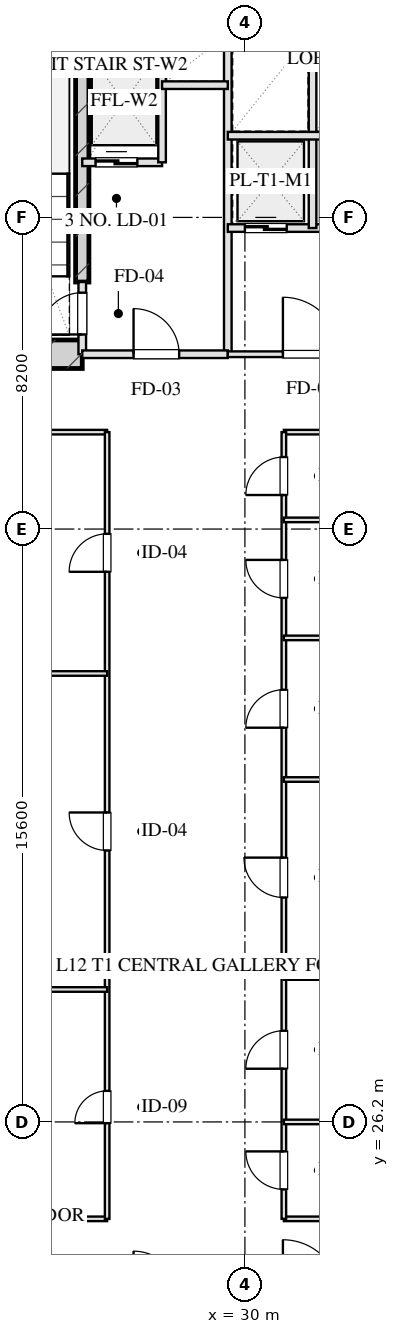
"""IFC4 building model, lengths in metres.
Left out: names, types, materials, properties, quantities, classifications, styles, units other than length and angle.
Written with IfcOpenShell. Run it as: python <this file> out.ifc"""

import sys

from ifc_helpers import new_model, si_unit, direction, frame, frame_2d, origin, place, context, subcontext, project, spatial, rectangle, extrude, element, fill, save


model = new_model("IFC4")
c1 = context("Model", 3, precision=1e-05, world=origin(), true_north=direction((0.0, 1.0)))
c2 = subcontext(c1, "Body", "Model", "MODEL_VIEW")
j1 = project(units=[si_unit("LENGTHUNIT", "METRE"), si_unit("PLANEANGLEUNIT", "RADIAN")], contexts=[c1])
p1 = place(None, origin())
s1 = spatial("IfcSite", under=j1, at=p1, CompositionType="ELEMENT")
p2 = place(p1, origin())
s2 = spatial("IfcBuilding", under=s1, at=p2, CompositionType="ELEMENT")
p3 = place(p2, frame((0.0, 0.0, 54.05)))
s3 = spatial("IfcBuildingStorey", under=s2, at=p3, CompositionType="ELEMENT", Elevation=54.05)
p4 = place(p3, frame((25.72, 48.3, 0.0), z_axis=(0.0, 0.0, 1.0), x_axis=(0.0, 1.0, 0.0)))
e1 = element("IfcWall", 1, at=p4, inside=s3, PredefinedType="SHEAR", context=c2, shape_type="SweptSolid", body=[
    extrude(rectangle(XDim=6.98, YDim=0.35, at=frame_2d((3.49, 0.0))), origin(), (0.0, 0.0, 1.0), 3.45),
])
p5 = place(p3, frame((21.425, 46.4, 0.0), z_axis=(0.0, 0.0, 1.0), x_axis=(1.0, 0.0, 0.0)))
e2 = element("IfcWall", 2, at=p5, inside=s3, PredefinedType="SHEAR", context=c2, shape_type="SweptSolid", body=[
    extrude(rectangle(XDim=4.295, YDim=0.75, at=frame_2d((2.147, 0.0))), origin(), (0.0, 0.0, 1.0), 3.45),
])
p6 = place(p3, frame((25.72, 46.4, 0.0), z_axis=(0.0, 0.0, 1.0), x_axis=(0.0, 1.0, 0.0)))
e3 = element("IfcWall", 3, at=p6, inside=s3, PredefinedType="PARTITIONING", context=c2, shape_type="SweptSolid", body=[
    extrude(rectangle(XDim=1.9, YDim=0.2, at=frame_2d((0.95, 0.0))), origin(), (0.0, 0.0, 1.0), 3.175),
])
p7 = place(p6, frame((0.52, 0.0, 0.0)))
e4 = element("IfcOpeningElement", 4, at=p7, cuts=e3, PredefinedType="OPENING", context=c2, shape_type="SweptSolid", body=[
    extrude(rectangle(XDim=1.1, YDim=2.05, at=frame_2d((0.55, 1.025))), frame((0.0, 0.11, 0.0), z_axis=(0.0, -1.0, 0.0), x_axis=(1.0, 0.0, 0.0)), (0.0, 0.0, 1.0), 0.22),
])
p8 = place(p3, frame((29.55, 46.4, 0.0), z_axis=(0.0, 0.0, 1.0), x_axis=(0.0, 1.0, 0.0)))
e5 = element("IfcWall", 5, at=p8, inside=s3, PredefinedType="PARTITIONING", context=c2, shape_type="SweptSolid", body=[
    extrude(rectangle(XDim=8.43, YDim=0.2, at=frame_2d((4.215, 0.0))), origin(), (0.0, 0.0, 1.0), 3.175),
])
p9 = place(p3, frame((25.72, 46.4, 0.0), z_axis=(0.0, 0.0, 1.0), x_axis=(1.0, 0.0, 0.0)))
e6 = element("IfcWall", 6, at=p9, inside=s3, PredefinedType="PARTITIONING", context=c2, shape_type="SweptSolid", body=[
    extrude(rectangle(XDim=3.83, YDim=0.2, at=frame_2d((1.915, 0.0))), origin(), (0.0, 0.0, 1.0), 3.175),
])
p10 = place(p9, frame((1.35, 0.0, 0.0)))
e7 = element("IfcOpeningElement", 7, at=p10, cuts=e6, PredefinedType="OPENING", context=c2, shape_type="SweptSolid", body=[
    extrude(rectangle(XDim=1.2, YDim=2.05, at=frame_2d((0.6, 1.025))), frame((0.0, 0.11, 0.0), z_axis=(0.0, -1.0, 0.0), x_axis=(1.0, 0.0, 0.0)), (0.0, 0.0, 1.0), 0.22),
])
p11 = place(p3, frame((25.72, 51.45, 0.0), z_axis=(0.0, 0.0, 1.0), x_axis=(1.0, 0.0, 0.0)))
e8 = element("IfcWall", 8, at=p11, inside=s3, PredefinedType="PARTITIONING", context=c2, shape_type="SweptSolid", body=[
    extrude(rectangle(XDim=2.1, YDim=0.2, at=frame_2d((1.05, 0.0))), origin(), (0.0, 0.0, 1.0), 3.175),
])
p12 = place(p11, frame((0.35, 0.0, 0.0)))
e9 = element("IfcOpeningElement", 9, at=p12, cuts=e8, PredefinedType="OPENING", context=c2, shape_type="SweptSolid", body=[
    extrude(rectangle(XDim=1.1, YDim=2.05, at=frame_2d((0.55, 1.025))), frame((0.0, 0.11, 0.0), z_axis=(0.0, -1.0, 0.0), x_axis=(1.0, 0.0, 0.0)), (0.0, 0.0, 1.0), 0.22),
])
p13 = place(p3, frame((27.82, 51.45, 0.0), z_axis=(0.0, 0.0, 1.0), x_axis=(0.0, 1.0, 0.0)))
e10 = element("IfcWall", 10, at=p13, inside=s3, PredefinedType="PARTITIONING", context=c2, shape_type="SweptSolid", body=[
    extrude(rectangle(XDim=3.7, YDim=0.2, at=frame_2d((1.85, 0.0))), origin(), (0.0, 0.0, 1.0), 3.175),
])
p14 = place(p3, frame((27.82, 53.48, 0.0), z_axis=(0.0, 0.0, 1.0), x_axis=(1.0, 0.0, 0.0)))
e11 = element("IfcWall", 11, at=p14, inside=s3, PredefinedType="PARTITIONING", context=c2, shape_type="SweptSolid", body=[
    extrude(rectangle(XDim=1.73, YDim=0.2, at=frame_2d((0.865, 0.0))), origin(), (0.0, 0.0, 1.0), 3.175),
])
p15 = place(p3, frame((29.55, 46.4, 0.0), z_axis=(0.0, 0.0, 1.0), x_axis=(1.0, 0.0, 0.0)))
e12 = element("IfcWall", 12, at=p15, inside=s3, PredefinedType="PARTITIONING", context=c2, shape_type="SweptSolid", body=[
    extrude(rectangle(XDim=4.4, YDim=0.15, at=frame_2d((2.2, 0.0))), origin(), (0.0, 0.0, 1.0), 3.175),
])
p16 = place(p15, frame((1.45, 0.0, 0.0)))
e13 = element("IfcOpeningElement", 13, at=p16, cuts=e12, PredefinedType="OPENING", context=c2, shape_type="SweptSolid", body=[
    extrude(rectangle(XDim=1.5, YDim=2.05, at=frame_2d((0.75, 1.025))), frame((0.0, 0.085, 0.0), z_axis=(0.0, -1.0, 0.0), x_axis=(1.0, 0.0, 0.0)), (0.0, 0.0, 1.0), 0.17),
])
p17 = place(p3, frame((29.55, 49.72, 0.0), z_axis=(0.0, 0.0, 1.0), x_axis=(1.0, 0.0, 0.0)))
e14 = element("IfcWall", 14, at=p17, inside=s3, PredefinedType="PARTITIONING", context=c2, shape_type="SweptSolid", body=[
    extrude(rectangle(XDim=4.4, YDim=0.2, at=frame_2d((2.2, 0.0))), origin(), (0.0, 0.0, 1.0), 3.175),
])
p18 = place(p17, frame((0.45, 0.0, 0.0)))
e15 = element("IfcOpeningElement", 15, at=p18, cuts=e14, PredefinedType="OPENING", context=c2, shape_type="SweptSolid", body=[
    extrude(rectangle(XDim=1.1, YDim=2.05, at=frame_2d((0.55, 1.025))), frame((0.0, 0.11, 0.0), z_axis=(0.0, -1.0, 0.0), x_axis=(1.0, 0.0, 0.0)), (0.0, 0.0, 1.0), 0.22),
])
p19 = place(p17, frame((2.55, 0.0, 0.0)))
e16 = element("IfcOpeningElement", 16, at=p19, cuts=e14, PredefinedType="OPENING", context=c2, shape_type="SweptSolid", body=[
    extrude(rectangle(XDim=1.1, YDim=2.05, at=frame_2d((0.55, 1.025))), frame((0.0, 0.11, 0.0), z_axis=(0.0, -1.0, 0.0), x_axis=(1.0, 0.0, 0.0)), (0.0, 0.0, 1.0), 0.22),
])
p20 = place(p3, frame((31.78, 49.72, 0.0), z_axis=(0.0, 0.0, 1.0), x_axis=(0.0, 1.0, 0.0)))
e17 = element("IfcWall", 17, at=p20, inside=s3, PredefinedType="PARTITIONING", context=c2, shape_type="SweptSolid", body=[
    extrude(rectangle(XDim=5.11, YDim=0.2, at=frame_2d((2.555, 0.0))), origin(), (0.0, 0.0, 1.0), 3.175),
])
p21 = place(p3, frame((29.55, 52.15, 0.0), z_axis=(0.0, 0.0, 1.0), x_axis=(1.0, 0.0, 0.0)))
e18 = element("IfcWall", 18, at=p21, inside=s3, PredefinedType="PARTITIONING", context=c2, shape_type="SweptSolid", body=[
    extrude(rectangle(XDim=4.4, YDim=0.2, at=frame_2d((2.2, 0.0))), origin(), (0.0, 0.0, 1.0), 3.175),
])
p22 = place(p3, frame((10.6, 23.65, 0.0), z_axis=(0.0, 0.0, 1.0), x_axis=(1.0, 0.0, 0.0)))
e19 = element("IfcWall", 19, at=p22, inside=s3, PredefinedType="PARTITIONING", context=c2, shape_type="SweptSolid", body=[
    extrude(rectangle(XDim=15.775, YDim=0.12, at=frame_2d((7.887, 0.0))), origin(), (0.0, 0.0, 1.0), 3.175),
])
p23 = place(p3, frame((31.025, 23.65, 0.0), z_axis=(0.0, 0.0, 1.0), x_axis=(1.0, 0.0, 0.0)))
e20 = element("IfcWall", 20, at=p23, inside=s3, PredefinedType="PARTITIONING", context=c2, shape_type="SweptSolid", body=[
    extrude(rectangle(XDim=18.375, YDim=0.12, at=frame_2d((9.188, 0.0))), origin(), (0.0, 0.0, 1.0), 3.175),
])
p24 = place(p3, frame((10.6, 44.35, 0.0), z_axis=(0.0, 0.0, 1.0), x_axis=(1.0, 0.0, 0.0)))
e21 = element("IfcWall", 21, at=p24, inside=s3, PredefinedType="PARTITIONING", context=c2, shape_type="SweptSolid", body=[
    extrude(rectangle(XDim=15.775, YDim=0.12, at=frame_2d((7.887, 0.0))), origin(), (0.0, 0.0, 1.0), 3.175),
])
p25 = place(p3, frame((31.025, 44.35, 0.0), z_axis=(0.0, 0.0, 1.0), x_axis=(1.0, 0.0, 0.0)))
e22 = element("IfcWall", 22, at=p25, inside=s3, PredefinedType="PARTITIONING", context=c2, shape_type="SweptSolid", body=[
    extrude(rectangle(XDim=18.375, YDim=0.12, at=frame_2d((9.188, 0.0))), origin(), (0.0, 0.0, 1.0), 3.175),
])
p26 = place(p3, frame((26.375, 23.65, 0.0), z_axis=(0.0, 0.0, 1.0), x_axis=(0.0, 1.0, 0.0)))
e23 = element("IfcWall", 23, at=p26, inside=s3, PredefinedType="PARTITIONING", context=c2, shape_type="SweptSolid", body=[
    extrude(rectangle(XDim=20.7, YDim=0.12, at=frame_2d((10.35, 0.0))), origin(), (0.0, 0.0, 1.0), 3.175),
])
p27 = place(p26, frame((2.518, 0.0, 0.0)))
e24 = element("IfcOpeningElement", 24, at=p27, cuts=e23, PredefinedType="OPENING", context=c2, shape_type="SweptSolid", body=[
    extrude(rectangle(XDim=0.85, YDim=2.05, at=frame_2d((0.425, 1.025))), frame((0.0, 0.07, 0.0), z_axis=(0.0, -1.0, 0.0), x_axis=(1.0, 0.0, 0.0)), (0.0, 0.0, 1.0), 0.14),
])
p28 = place(p26, frame((9.692, 0.0, 0.0)))
e25 = element("IfcOpeningElement", 25, at=p28, cuts=e23, PredefinedType="OPENING", context=c2, shape_type="SweptSolid", body=[
    extrude(rectangle(XDim=1.0, YDim=2.05, at=frame_2d((0.5, 1.025))), frame((0.0, 0.07, 0.0), z_axis=(0.0, -1.0, 0.0), x_axis=(1.0, 0.0, 0.0)), (0.0, 0.0, 1.0), 0.14),
])
p29 = place(p26, frame((17.025, 0.0, 0.0)))
e26 = element("IfcOpeningElement", 26, at=p29, cuts=e23, PredefinedType="OPENING", context=c2, shape_type="SweptSolid", body=[
    extrude(rectangle(XDim=1.0, YDim=2.05, at=frame_2d((0.5, 1.025))), frame((0.0, 0.07, 0.0), z_axis=(0.0, -1.0, 0.0), x_axis=(1.0, 0.0, 0.0)), (0.0, 0.0, 1.0), 0.14),
])
p30 = place(p3, frame((31.025, 23.65, 0.0), z_axis=(0.0, 0.0, 1.0), x_axis=(0.0, 1.0, 0.0)))
e27 = element("IfcWall", 27, at=p30, inside=s3, PredefinedType="PARTITIONING", context=c2, shape_type="SweptSolid", body=[
    extrude(rectangle(XDim=20.7, YDim=0.12, at=frame_2d((10.35, 0.0))), origin(), (0.0, 0.0, 1.0), 3.175),
])
p31 = place(p30, frame((0.775, 0.0, 0.0)))
e28 = element("IfcOpeningElement", 28, at=p31, cuts=e27, PredefinedType="OPENING", context=c2, shape_type="SweptSolid", body=[
    extrude(rectangle(XDim=1.0, YDim=2.05, at=frame_2d((0.5, 1.025))), frame((0.0, 0.07, 0.0), z_axis=(0.0, -1.0, 0.0), x_axis=(1.0, 0.0, 0.0)), (0.0, 0.0, 1.0), 0.14),
])
p32 = place(p30, frame((3.95, 0.0, 0.0)))
e29 = element("IfcOpeningElement", 29, at=p32, cuts=e27, PredefinedType="OPENING", context=c2, shape_type="SweptSolid", body=[
    extrude(rectangle(XDim=1.0, YDim=2.05, at=frame_2d((0.5, 1.025))), frame((0.0, 0.07, 0.0), z_axis=(0.0, -1.0, 0.0), x_axis=(1.0, 0.0, 0.0)), (0.0, 0.0, 1.0), 0.14),
])
p33 = place(p30, frame((8.455, 0.0, 0.0)))
e30 = element("IfcOpeningElement", 30, at=p33, cuts=e27, PredefinedType="OPENING", context=c2, shape_type="SweptSolid", body=[
    extrude(rectangle(XDim=1.05, YDim=2.05, at=frame_2d((0.525, 1.025))), frame((0.0, 0.07, 0.0), z_axis=(0.0, -1.0, 0.0), x_axis=(1.0, 0.0, 0.0)), (0.0, 0.0, 1.0), 0.14),
])
p34 = place(p30, frame((12.923, 0.0, 0.0)))
e31 = element("IfcOpeningElement", 31, at=p34, cuts=e27, PredefinedType="OPENING", context=c2, shape_type="SweptSolid", body=[
    extrude(rectangle(XDim=1.0, YDim=2.05, at=frame_2d((0.5, 1.025))), frame((0.0, 0.07, 0.0), z_axis=(0.0, -1.0, 0.0), x_axis=(1.0, 0.0, 0.0)), (0.0, 0.0, 1.0), 0.14),
])
p35 = place(p30, frame((16.338, 0.0, 0.0)))
e32 = element("IfcOpeningElement", 32, at=p35, cuts=e27, PredefinedType="OPENING", context=c2, shape_type="SweptSolid", body=[
    extrude(rectangle(XDim=1.0, YDim=2.05, at=frame_2d((0.5, 1.025))), frame((0.0, 0.07, 0.0), z_axis=(0.0, -1.0, 0.0), x_axis=(1.0, 0.0, 0.0)), (0.0, 0.0, 1.0), 0.14),
])
p36 = place(p30, frame((19.045, 0.0, 0.0)))
e33 = element("IfcOpeningElement", 33, at=p36, cuts=e27, PredefinedType="OPENING", context=c2, shape_type="SweptSolid", body=[
    extrude(rectangle(XDim=1.0, YDim=2.05, at=frame_2d((0.5, 1.025))), frame((0.0, 0.07, 0.0), z_axis=(0.0, -1.0, 0.0), x_axis=(1.0, 0.0, 0.0)), (0.0, 0.0, 1.0), 0.14),
])
for number, where, z_axis, x_axis in (
    (34, (10.6, 29.685, 0.0), (0.0, 0.0, 1.0), (1.0, 0.0, 0.0)),
    (35, (10.6, 38.0, 0.0), (0.0, 0.0, 1.0), (1.0, 0.0, 0.0)),
):
    element("IfcWall", number, at=place(p3, frame(where, z_axis=z_axis, x_axis=x_axis)), inside=s3, PredefinedType="PARTITIONING", context=c2, shape_type="SweptSolid", body=[
        extrude(rectangle(XDim=15.775, YDim=0.12, at=frame_2d((7.887, 0.0))), origin(), (0.0, 0.0, 1.0), 3.175),
    ])
for number, where, z_axis, x_axis in (
    (36, (31.025, 26.2, 0.0), (0.0, 0.0, 1.0), (1.0, 0.0, 0.0)),
    (37, (31.025, 30.0, 0.0), (0.0, 0.0, 1.0), (1.0, 0.0, 0.0)),
    (38, (31.025, 35.21, 0.0), (0.0, 0.0, 1.0), (1.0, 0.0, 0.0)),
    (39, (31.025, 38.936, 0.0), (0.0, 0.0, 1.0), (1.0, 0.0, 0.0)),
    (40, (31.025, 42.041, 0.0), (0.0, 0.0, 1.0), (1.0, 0.0, 0.0)),
):
    element("IfcWall", number, at=place(p3, frame(where, z_axis=z_axis, x_axis=x_axis)), inside=s3, PredefinedType="PARTITIONING", context=c2, shape_type="SweptSolid", body=[
        extrude(rectangle(XDim=18.375, YDim=0.12, at=frame_2d((9.188, 0.0))), origin(), (0.0, 0.0, 1.0), 3.175),
    ])
p37 = place(p7, origin())
e41 = element("IfcDoor", 41, at=p37, inside=s3, OperationType="SINGLE_SWING_LEFT", PredefinedType="DOOR", context=c2, shape_type="SweptSolid", body=[
    extrude(rectangle(XDim=1.1, YDim=2.05, at=frame_2d((0.55, 1.025))), frame((0.0, 0.025, 0.0), z_axis=(0.0, -1.0, 0.0), x_axis=(1.0, 0.0, 0.0)), (0.0, 0.0, 1.0), 0.05),
])
fill(e4, e41)
p38 = place(p10, origin())
e42 = element("IfcDoor", 42, at=p38, inside=s3, OperationType="SINGLE_SWING_LEFT", PredefinedType="DOOR", context=c2, shape_type="SweptSolid", body=[
    extrude(rectangle(XDim=1.2, YDim=2.05, at=frame_2d((0.6, 1.025))), frame((0.0, 0.025, 0.0), z_axis=(0.0, -1.0, 0.0), x_axis=(1.0, 0.0, 0.0)), (0.0, 0.0, 1.0), 0.05),
])
fill(e7, e42)
p39 = place(p12, origin())
e43 = element("IfcDoor", 43, at=p39, inside=s3, OperationType="DOUBLE_DOOR_SLIDING", PredefinedType="DOOR", context=c2, shape_type="SweptSolid", body=[
    extrude(rectangle(XDim=1.1, YDim=2.05, at=frame_2d((0.55, 1.025))), frame((0.0, 0.025, 0.0), z_axis=(0.0, -1.0, 0.0), x_axis=(1.0, 0.0, 0.0)), (0.0, 0.0, 1.0), 0.05),
])
fill(e9, e43)
p40 = place(p16, origin())
e44 = element("IfcDoor", 44, at=p40, inside=s3, OperationType="SINGLE_SWING_LEFT", PredefinedType="DOOR", context=c2, shape_type="SweptSolid", body=[
    extrude(rectangle(XDim=1.5, YDim=2.05, at=frame_2d((0.75, 1.025))), frame((0.0, 0.025, 0.0), z_axis=(0.0, -1.0, 0.0), x_axis=(1.0, 0.0, 0.0)), (0.0, 0.0, 1.0), 0.05),
])
fill(e13, e44)
p41 = place(p18, origin())
e45 = element("IfcDoor", 45, at=p41, inside=s3, OperationType="DOUBLE_DOOR_SLIDING", PredefinedType="DOOR", context=c2, shape_type="SweptSolid", body=[
    extrude(rectangle(XDim=1.1, YDim=2.05, at=frame_2d((0.55, 1.025))), frame((0.0, 0.025, 0.0), z_axis=(0.0, -1.0, 0.0), x_axis=(1.0, 0.0, 0.0)), (0.0, 0.0, 1.0), 0.05),
])
fill(e15, e45)
p42 = place(p27, origin())
e46 = element("IfcDoor", 46, at=p42, inside=s3, OperationType="SINGLE_SWING_LEFT", PredefinedType="DOOR", context=c2, shape_type="SweptSolid", body=[
    extrude(rectangle(XDim=0.85, YDim=2.05, at=frame_2d((0.425, 1.025))), frame((0.0, 0.025, 0.0), z_axis=(0.0, -1.0, 0.0), x_axis=(1.0, 0.0, 0.0)), (0.0, 0.0, 1.0), 0.05),
])
fill(e24, e46)
p43 = place(p28, origin())
e47 = element("IfcDoor", 47, at=p43, inside=s3, OperationType="SINGLE_SWING_RIGHT", PredefinedType="DOOR", context=c2, shape_type="SweptSolid", body=[
    extrude(rectangle(XDim=1.0, YDim=2.05, at=frame_2d((0.5, 1.025))), frame((0.0, 0.025, 0.0), z_axis=(0.0, -1.0, 0.0), x_axis=(1.0, 0.0, 0.0)), (0.0, 0.0, 1.0), 0.05),
])
fill(e25, e47)
p44 = place(p29, origin())
e48 = element("IfcDoor", 48, at=p44, inside=s3, OperationType="SINGLE_SWING_LEFT", PredefinedType="DOOR", context=c2, shape_type="SweptSolid", body=[
    extrude(rectangle(XDim=1.0, YDim=2.05, at=frame_2d((0.5, 1.025))), frame((0.0, 0.025, 0.0), z_axis=(0.0, -1.0, 0.0), x_axis=(1.0, 0.0, 0.0)), (0.0, 0.0, 1.0), 0.05),
])
fill(e26, e48)
p45 = place(p31, origin())
e49 = element("IfcDoor", 49, at=p45, inside=s3, OperationType="SINGLE_SWING_RIGHT", PredefinedType="DOOR", context=c2, shape_type="SweptSolid", body=[
    extrude(rectangle(XDim=1.0, YDim=2.05, at=frame_2d((0.5, 1.025))), frame((0.0, 0.025, 0.0), z_axis=(0.0, -1.0, 0.0), x_axis=(1.0, 0.0, 0.0)), (0.0, 0.0, 1.0), 0.05),
])
fill(e28, e49)
p46 = place(p32, origin())
e50 = element("IfcDoor", 50, at=p46, inside=s3, OperationType="SINGLE_SWING_LEFT", PredefinedType="DOOR", context=c2, shape_type="SweptSolid", body=[
    extrude(rectangle(XDim=1.0, YDim=2.05, at=frame_2d((0.5, 1.025))), frame((0.0, 0.025, 0.0), z_axis=(0.0, -1.0, 0.0), x_axis=(1.0, 0.0, 0.0)), (0.0, 0.0, 1.0), 0.05),
])
fill(e29, e50)
p47 = place(p33, origin())
e51 = element("IfcDoor", 51, at=p47, inside=s3, OperationType="SINGLE_SWING_RIGHT", PredefinedType="DOOR", context=c2, shape_type="SweptSolid", body=[
    extrude(rectangle(XDim=1.05, YDim=2.05, at=frame_2d((0.525, 1.025))), frame((0.0, 0.025, 0.0), z_axis=(0.0, -1.0, 0.0), x_axis=(1.0, 0.0, 0.0)), (0.0, 0.0, 1.0), 0.05),
])
fill(e30, e51)
p48 = place(p34, origin())
e52 = element("IfcDoor", 52, at=p48, inside=s3, OperationType="SINGLE_SWING_LEFT", PredefinedType="DOOR", context=c2, shape_type="SweptSolid", body=[
    extrude(rectangle(XDim=1.0, YDim=2.05, at=frame_2d((0.5, 1.025))), frame((0.0, 0.025, 0.0), z_axis=(0.0, -1.0, 0.0), x_axis=(1.0, 0.0, 0.0)), (0.0, 0.0, 1.0), 0.05),
])
fill(e31, e52)
p49 = place(p35, origin())
e53 = element("IfcDoor", 53, at=p49, inside=s3, OperationType="SINGLE_SWING_RIGHT", PredefinedType="DOOR", context=c2, shape_type="SweptSolid", body=[
    extrude(rectangle(XDim=1.0, YDim=2.05, at=frame_2d((0.5, 1.025))), frame((0.0, 0.025, 0.0), z_axis=(0.0, -1.0, 0.0), x_axis=(1.0, 0.0, 0.0)), (0.0, 0.0, 1.0), 0.05),
])
fill(e32, e53)
p50 = place(p36, origin())
e54 = element("IfcDoor", 54, at=p50, inside=s3, OperationType="SINGLE_SWING_LEFT", PredefinedType="DOOR", context=c2, shape_type="SweptSolid", body=[
    extrude(rectangle(XDim=1.0, YDim=2.05, at=frame_2d((0.5, 1.025))), frame((0.0, 0.025, 0.0), z_axis=(0.0, -1.0, 0.0), x_axis=(1.0, 0.0, 0.0)), (0.0, 0.0, 1.0), 0.05),
])
fill(e33, e54)
save(model, sys.argv[1])
